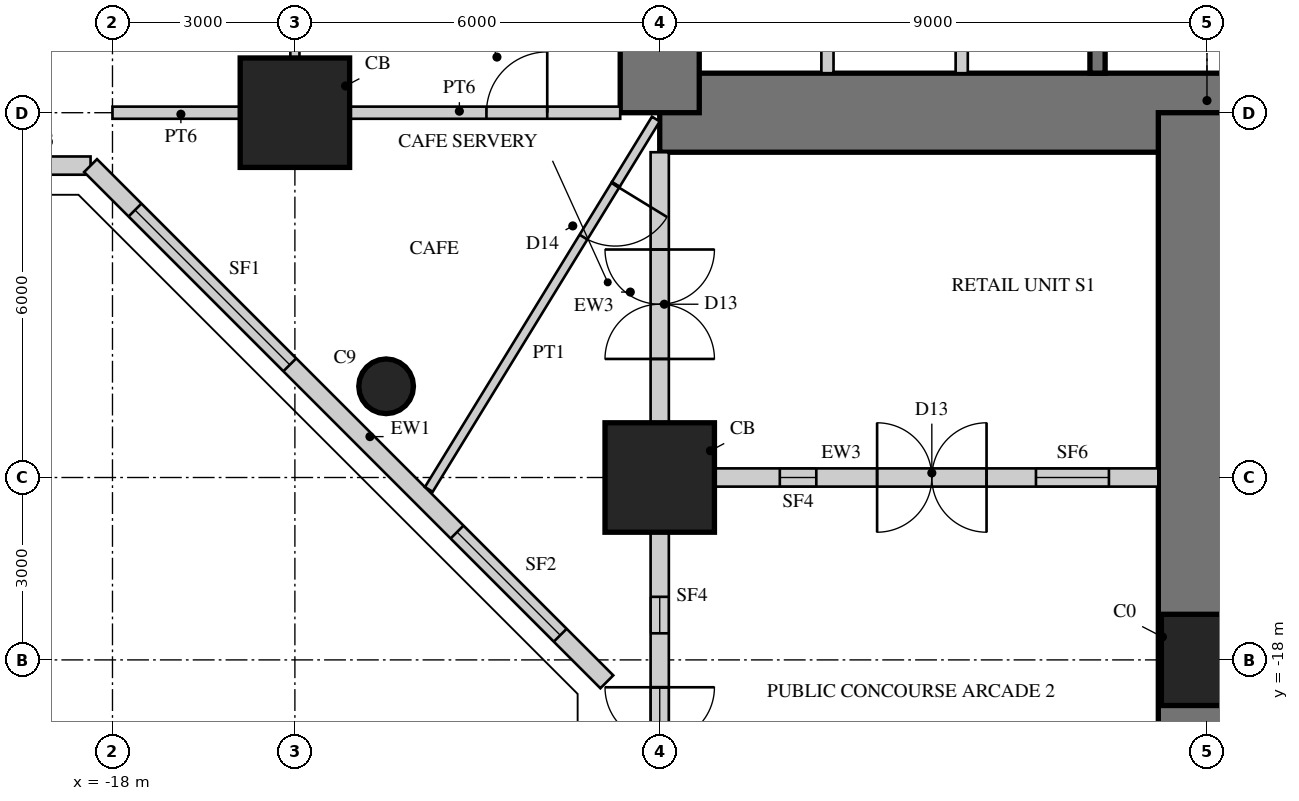
"""IFC4 building model, lengths in metres.
Left out: names, types, materials, properties, quantities, classifications, styles, units other than length and angle.
Written with IfcOpenShell. Run it as: python <this file> out.ifc"""

import sys

from ifc_helpers import new_model, si_unit, direction, frame, frame_2d, origin, origin_2d, place, context, subcontext, project, spatial, rectangle, hollow_rectangle, circle, extrude, element, fill, save


model = new_model("IFC4")
c1 = context("Model", 3, precision=1e-05, world=origin(), true_north=direction((0.0, 1.0)))
c2 = subcontext(c1, "Body", "Model", "MODEL_VIEW")
j1 = project(units=[si_unit("LENGTHUNIT", "METRE"), si_unit("PLANEANGLEUNIT", "RADIAN")], contexts=[c1])
p1 = place(None, origin())
s1 = spatial("IfcSite", under=j1, at=p1, CompositionType="ELEMENT")
p2 = place(p1, origin())
s2 = spatial("IfcBuilding", under=s1, at=p2, CompositionType="ELEMENT")
p3 = place(p2, origin())
s3 = spatial("IfcBuildingStorey", under=s2, at=p3, CompositionType="ELEMENT", Elevation=0.0)
p4 = place(p3, frame((-9.0, -9.0, 0.0), z_axis=(0.0, 0.0, 1.0), x_axis=(1.0, 0.0, 0.0)))
e1 = element("IfcWall", 1, at=p4, inside=s3, PredefinedType="SHEAR", context=c2, shape_type="SweptSolid", body=[
    extrude(rectangle(XDim=18.0, YDim=1.3, at=frame_2d((9.0, 0.0))), origin(), (0.0, 0.0, 1.0), 5.0),
])
p5 = place(p4, frame((9.8, 0.0, 0.0)))
e2 = element("IfcOpeningElement", 2, at=p5, cuts=e1, PredefinedType="OPENING", context=c2, shape_type="SweptSolid", body=[
    extrude(rectangle(XDim=1.0, YDim=2.4, at=frame_2d((0.5, 1.2))), frame((0.0, 0.66, 0.0), z_axis=(0.0, -1.0, 0.0), x_axis=(1.0, 0.0, 0.0)), (0.0, 0.0, 1.0), 1.32),
])
p6 = place(p3, frame((-9.0, 9.0, 0.0), z_axis=(0.0, 0.0, 1.0), x_axis=(0.0, -1.0, 0.0)))
e3 = element("IfcWall", 3, at=p6, inside=s3, PredefinedType="SHEAR", context=c2, shape_type="SweptSolid", body=[
    extrude(rectangle(XDim=18.0, YDim=1.3, at=frame_2d((9.0, 0.0))), origin(), (0.0, 0.0, 1.0), 5.0),
])
p7 = place(p6, frame((9.8, 0.0, 0.0)))
e4 = element("IfcOpeningElement", 4, at=p7, cuts=e3, PredefinedType="OPENING", context=c2, shape_type="SweptSolid", body=[
    extrude(rectangle(XDim=1.0, YDim=2.4, at=frame_2d((0.5, 1.2))), frame((0.0, 0.66, 0.0), z_axis=(0.0, -1.0, 0.0), x_axis=(1.0, 0.0, 0.0)), (0.0, 0.0, 1.0), 1.32),
])
p8 = place(p3, frame((-1.8, -1.875, 0.0), z_axis=(0.0, 0.0, 1.0), x_axis=(0.0, -1.0, 0.0)))
e5 = element("IfcWall", 5, at=p8, inside=s3, PredefinedType="SHEAR", context=c2, shape_type="SweptSolid", body=[
    extrude(rectangle(XDim=6.475, YDim=0.25, at=frame_2d((3.238, 0.0))), origin(), (0.0, 0.0, 1.0), 5.0),
])
p9 = place(p8, frame((1.875, 0.0, 0.0)))
e6 = element("IfcOpeningElement", 6, at=p9, cuts=e5, PredefinedType="OPENING", context=c2, shape_type="SweptSolid", body=[
    extrude(rectangle(XDim=1.6, YDim=2.4, at=frame_2d((0.8, 1.2))), frame((0.0, 0.135, 0.0), z_axis=(0.0, -1.0, 0.0), x_axis=(1.0, 0.0, 0.0)), (0.0, 0.0, 1.0), 0.27),
])
for number, where, z_axis, x_axis in (
    (7, (-4.033, -5.975, 0.0), (0.0, 0.0, 1.0), (0.0, -1.0, 0.0)),
    (8, (-6.242, -5.975, 0.0), (0.0, 0.0, 1.0), (0.0, -1.0, 0.0)),
):
    element("IfcWall", number, at=place(p3, frame(where, z_axis=z_axis, x_axis=x_axis)), inside=s3, PredefinedType="PARTITIONING", context=c2, shape_type="SweptSolid", body=[
        extrude(rectangle(XDim=2.375, YDim=0.2, at=frame_2d((1.188, 0.0))), origin(), (0.0, 0.0, 1.0), 5.0),
    ])
p10 = place(p3, frame((0.0, -9.0, 0.0), z_axis=(0.0, 0.0, 1.0), x_axis=(0.0, -1.0, 0.0)))
e9 = element("IfcWall", 9, at=p10, inside=s3, PredefinedType="SHEAR", context=c2, shape_type="SweptSolid", body=[
    extrude(rectangle(XDim=18.0, YDim=1.6, at=frame_2d((9.0, 0.0))), origin(), (0.0, 0.0, 1.0), 5.0),
])
p11 = place(p10, frame((10.05, 0.0, 0.0)))
e10 = element("IfcOpeningElement", 10, at=p11, cuts=e9, PredefinedType="OPENING", context=c2, shape_type="SweptSolid", body=[
    extrude(rectangle(XDim=1.8, YDim=2.4, at=frame_2d((0.9, 1.2))), frame((0.0, 0.81, 0.0), z_axis=(0.0, -1.0, 0.0), x_axis=(1.0, 0.0, 0.0)), (0.0, 0.0, 1.0), 1.62),
])
for number, where, z_axis, x_axis in (
    (11, (-9.0, -15.0, 0.0), (0.0, 0.0, 1.0), (1.0, 0.0, 0.0)),
    (12, (-15.0, -9.0, 0.0), (0.0, 0.0, 1.0), (1.0, 0.0, 0.0)),
):
    element("IfcColumn", number, at=place(p3, frame(where, z_axis=z_axis, x_axis=x_axis)), inside=s3, PredefinedType="COLUMN", context=c2, shape_type="SweptSolid", body=[
        extrude(rectangle(XDim=1.8, YDim=1.8, at=origin_2d()), origin(), (0.0, 0.0, 1.0), 5.0),
    ])
p12 = place(p3, frame((0.0, -18.0, 0.0), z_axis=(0.0, 0.0, 1.0), x_axis=(1.0, 0.0, 0.0)))
e13 = element("IfcColumn", 13, at=p12, inside=s3, PredefinedType="COLUMN", context=c2, shape_type="SweptSolid", body=[
    extrude(rectangle(XDim=1.5, YDim=1.5, at=origin_2d()), origin(), (0.0, 0.0, 1.0), 5.0),
])
p13 = place(p3, frame((-13.5, -13.5, 0.0), z_axis=(0.0, 0.0, 1.0), x_axis=(1.0, 0.0, 0.0)))
e14 = element("IfcColumn", 14, at=p13, inside=s3, PredefinedType="COLUMN", context=c2, shape_type="SweptSolid", body=[
    extrude(circle(Radius=0.45, at=origin_2d()), origin(), (0.0, 0.0, 1.0), 5.0),
])
p14 = place(p3, frame((-24.36, -9.87, 0.0), z_axis=(0.0, 0.0, 1.0), x_axis=(1.0, 0.0, 0.0)))
e15 = element("IfcWall", 15, at=p14, inside=s3, PredefinedType="SOLIDWALL", context=c2, shape_type="SweptSolid", body=[
    extrude(rectangle(XDim=6.0, YDim=0.3, at=frame_2d((3.0, 0.0))), origin(), (0.0, 0.0, 1.0), 4.8),
])
p15 = place(p14, frame((1.475, 0.0, 0.3)))
e16 = element("IfcOpeningElement", 16, at=p15, cuts=e15, PredefinedType="OPENING", context=c2, shape_type="SweptSolid", body=[
    extrude(rectangle(XDim=1.2, YDim=3.9, at=frame_2d((0.6, 1.95))), frame((0.0, 0.16, 0.0), z_axis=(0.0, -1.0, 0.0), x_axis=(1.0, 0.0, 0.0)), (0.0, 0.0, 1.0), 0.32),
])
p16 = place(p14, frame((3.77, 0.0, 0.3)))
e17 = element("IfcOpeningElement", 17, at=p16, cuts=e15, PredefinedType="OPENING", context=c2, shape_type="SweptSolid", body=[
    extrude(rectangle(XDim=1.2, YDim=3.9, at=frame_2d((0.6, 1.95))), frame((0.0, 0.16, 0.0), z_axis=(0.0, -1.0, 0.0), x_axis=(1.0, 0.0, 0.0)), (0.0, 0.0, 1.0), 0.32),
])
p17 = place(p3, frame((-18.36, -9.87, 0.0), z_axis=(0.0, 0.0, 1.0), x_axis=(0.707106781187, -0.707106781187, 0.0)))
e18 = element("IfcWall", 18, at=p17, inside=s3, PredefinedType="SOLIDWALL", context=c2, shape_type="SweptSolid", body=[
    extrude(rectangle(XDim=12.007, YDim=0.3, at=frame_2d((6.003, 0.0))), origin(), (0.0, 0.0, 1.0), 4.8),
])
p18 = place(p17, frame((1.034, 0.0, 0.3)))
e19 = element("IfcOpeningElement", 19, at=p18, cuts=e18, PredefinedType="OPENING", context=c2, shape_type="SweptSolid", body=[
    extrude(rectangle(XDim=3.6, YDim=3.9, at=frame_2d((1.8, 1.95))), frame((0.0, 0.16, 0.0), z_axis=(0.0, -1.0, 0.0), x_axis=(1.0, 0.0, 0.0)), (0.0, 0.0, 1.0), 0.32),
])
p19 = place(p17, frame((8.523, 0.0, 0.3)))
e20 = element("IfcOpeningElement", 20, at=p19, cuts=e18, PredefinedType="OPENING", context=c2, shape_type="SweptSolid", body=[
    extrude(rectangle(XDim=2.4, YDim=3.9, at=frame_2d((1.2, 1.95))), frame((0.0, 0.16, 0.0), z_axis=(0.0, -1.0, 0.0), x_axis=(1.0, 0.0, 0.0)), (0.0, 0.0, 1.0), 0.32),
])
p20 = place(p3, frame((-8.25, -15.0, 0.0), z_axis=(0.0, 0.0, 1.0), x_axis=(1.0, 0.0, 0.0)))
e21 = element("IfcWall", 21, at=p20, inside=s3, PredefinedType="SOLIDWALL", context=c2, shape_type="SweptSolid", body=[
    extrude(rectangle(XDim=7.45, YDim=0.3, at=frame_2d((3.725, 0.0))), origin(), (0.0, 0.0, 1.0), 3.85),
])
p21 = place(p20, frame((2.825, 0.0, 0.0)))
e22 = element("IfcOpeningElement", 22, at=p21, cuts=e21, PredefinedType="OPENING", context=c2, shape_type="SweptSolid", body=[
    extrude(rectangle(XDim=1.8, YDim=2.4, at=frame_2d((0.9, 1.2))), frame((0.0, 0.16, 0.0), z_axis=(0.0, -1.0, 0.0), x_axis=(1.0, 0.0, 0.0)), (0.0, 0.0, 1.0), 0.32),
])
p22 = place(p20, frame((1.225, 0.0, 0.3)))
e23 = element("IfcOpeningElement", 23, at=p22, cuts=e21, PredefinedType="OPENING", context=c2, shape_type="SweptSolid", body=[
    extrude(rectangle(XDim=0.6, YDim=3.4, at=frame_2d((0.3, 1.7))), frame((0.0, 0.16, 0.0), z_axis=(0.0, -1.0, 0.0), x_axis=(1.0, 0.0, 0.0)), (0.0, 0.0, 1.0), 0.32),
])
p23 = place(p20, frame((5.438, 0.0, 0.3)))
e24 = element("IfcOpeningElement", 24, at=p23, cuts=e21, PredefinedType="OPENING", context=c2, shape_type="SweptSolid", body=[
    extrude(rectangle(XDim=1.2, YDim=3.4, at=frame_2d((0.6, 1.7))), frame((0.0, 0.16, 0.0), z_axis=(0.0, -1.0, 0.0), x_axis=(1.0, 0.0, 0.0)), (0.0, 0.0, 1.0), 0.32),
])
p24 = place(p3, frame((-15.0, -2.375, 0.0), z_axis=(0.0, 0.0, 1.0), x_axis=(0.0, -1.0, 0.0)))
e25 = element("IfcWall", 25, at=p24, inside=s3, PredefinedType="PARTITIONING", context=c2, shape_type="SweptSolid", body=[
    extrude(rectangle(XDim=5.875, YDim=0.15, at=frame_2d((2.938, 0.0))), origin(), (0.0, 0.0, 1.0), 3.85),
])
p25 = place(p24, frame((0.969, 0.0, 0.0)))
e26 = element("IfcOpeningElement", 26, at=p25, cuts=e25, PredefinedType="OPENING", context=c2, shape_type="SweptSolid", body=[
    extrude(rectangle(XDim=1.0, YDim=2.1, at=frame_2d((0.5, 1.05))), frame((0.0, 0.085, 0.0), z_axis=(0.0, -1.0, 0.0), x_axis=(1.0, 0.0, 0.0)), (0.0, 0.0, 1.0), 0.17),
])
p26 = place(p24, frame((3.906, 0.0, 0.0)))
e27 = element("IfcOpeningElement", 27, at=p26, cuts=e25, PredefinedType="OPENING", context=c2, shape_type="SweptSolid", body=[
    extrude(rectangle(XDim=1.0, YDim=2.1, at=frame_2d((0.5, 1.05))), frame((0.0, 0.085, 0.0), z_axis=(0.0, -1.0, 0.0), x_axis=(1.0, 0.0, 0.0)), (0.0, 0.0, 1.0), 0.17),
])
p27 = place(p3, frame((-9.064, -9.104, 0.0), z_axis=(0.0, 0.0, 1.0), x_axis=(-0.522444037035, -0.852673576562, 0.0)))
e28 = element("IfcWall", 28, at=p27, inside=s3, PredefinedType="PARTITIONING", context=c2, shape_type="SweptSolid", body=[
    extrude(rectangle(XDim=1.261, YDim=0.15, at=frame_2d((0.631, 0.0))), origin(), (0.0, 0.0, 1.0), 3.9),
])
p28 = place(p3, frame((-9.723, -10.18, 0.0), z_axis=(0.0, 0.0, 1.0), x_axis=(-0.522582491182, -0.852588728468, 0.0)))
e29 = element("IfcWall", 29, at=p28, inside=s3, PredefinedType="PARTITIONING", context=c2, shape_type="SweptSolid", body=[
    extrude(rectangle(XDim=5.884, YDim=0.15, at=frame_2d((2.942, 0.0))), origin(), (0.0, 0.0, 1.0), 4.8),
])
p29 = place(p28, frame((0.016, 0.0, 0.0)))
e30 = element("IfcOpeningElement", 30, at=p29, cuts=e29, PredefinedType="OPENING", context=c2, shape_type="SweptSolid", body=[
    extrude(rectangle(XDim=1.0, YDim=2.2, at=frame_2d((0.5, 1.1))), frame((0.0, 0.085, 0.0), z_axis=(0.0, -1.0, 0.0), x_axis=(1.0, 0.0, 0.0)), (0.0, 0.0, 1.0), 0.17),
])
p30 = place(p3, frame((-9.65, -9.0, 0.0), z_axis=(0.0, 0.0, 1.0), x_axis=(-1.0, 0.0, 0.0)))
e31 = element("IfcWall", 31, at=p30, inside=s3, PredefinedType="SOLIDWALL", context=c2, shape_type="SweptSolid", body=[
    extrude(rectangle(XDim=4.6, YDim=0.2, at=frame_2d((2.3, 0.0))), origin(), (0.0, 0.0, 1.0), 3.8),
])
p31 = place(p30, frame((1.2, 0.0, 0.0)))
e32 = element("IfcOpeningElement", 32, at=p31, cuts=e31, PredefinedType="OPENING", context=c2, shape_type="SweptSolid", body=[
    extrude(rectangle(XDim=1.0, YDim=2.2, at=frame_2d((0.5, 1.1))), frame((0.0, 0.11, 0.0), z_axis=(0.0, -1.0, 0.0), x_axis=(1.0, 0.0, 0.0)), (0.0, 0.0, 1.0), 0.22),
])
p32 = place(p3, frame((-15.75, -9.0, 0.0), z_axis=(0.0, 0.0, 1.0), x_axis=(-1.0, 0.0, 0.0)))
e33 = element("IfcWall", 33, at=p32, inside=s3, PredefinedType="SOLIDWALL", context=c2, shape_type="SweptSolid", body=[
    extrude(rectangle(XDim=2.25, YDim=0.2, at=frame_2d((1.125, 0.0))), origin(), (0.0, 0.0, 1.0), 3.8),
])
p33 = place(p3, frame((-9.0, -14.25, 0.0), z_axis=(0.0, 0.0, 1.0), x_axis=(0.0, 1.0, 0.0)))
e34 = element("IfcWall", 34, at=p33, inside=s3, PredefinedType="SOLIDWALL", context=c2, shape_type="SweptSolid", body=[
    extrude(rectangle(XDim=4.6, YDim=0.3, at=frame_2d((2.3, 0.0))), origin(), (0.0, 0.0, 1.0), 3.8),
])
p34 = place(p33, frame((1.2, 0.0, 0.0)))
e35 = element("IfcOpeningElement", 35, at=p34, cuts=e34, PredefinedType="OPENING", context=c2, shape_type="SweptSolid", body=[
    extrude(rectangle(XDim=1.8, YDim=2.4, at=frame_2d((0.9, 1.2))), frame((0.0, 0.16, 0.0), z_axis=(0.0, -1.0, 0.0), x_axis=(1.0, 0.0, 0.0)), (0.0, 0.0, 1.0), 0.32),
])
p35 = place(p3, frame((-9.0, -23.25, 0.0), z_axis=(0.0, 0.0, 1.0), x_axis=(0.0, 1.0, 0.0)))
e36 = element("IfcWall", 36, at=p35, inside=s3, PredefinedType="SOLIDWALL", context=c2, shape_type="SweptSolid", body=[
    extrude(rectangle(XDim=7.5, YDim=0.3, at=frame_2d((3.75, 0.0))), origin(), (0.0, 0.0, 1.0), 3.8),
])
p36 = place(p35, frame((3.0, 0.0, 0.0)))
e37 = element("IfcOpeningElement", 37, at=p36, cuts=e36, PredefinedType="OPENING", context=c2, shape_type="SweptSolid", body=[
    extrude(rectangle(XDim=1.8, YDim=2.4, at=frame_2d((0.9, 1.2))), frame((0.0, 0.16, 0.0), z_axis=(0.0, -1.0, 0.0), x_axis=(1.0, 0.0, 0.0)), (0.0, 0.0, 1.0), 0.32),
])
p37 = place(p35, frame((2.24, 0.0, 0.3)))
e38 = element("IfcOpeningElement", 38, at=p37, cuts=e36, PredefinedType="OPENING", context=c2, shape_type="SweptSolid", body=[
    extrude(rectangle(XDim=0.6, YDim=3.4, at=frame_2d((0.3, 1.7))), frame((0.0, 0.16, 0.0), z_axis=(0.0, -1.0, 0.0), x_axis=(1.0, 0.0, 0.0)), (0.0, 0.0, 1.0), 0.32),
])
p38 = place(p35, frame((5.688, 0.0, 0.3)))
e39 = element("IfcOpeningElement", 39, at=p38, cuts=e36, PredefinedType="OPENING", context=c2, shape_type="SweptSolid", body=[
    extrude(rectangle(XDim=0.6, YDim=3.4, at=frame_2d((0.3, 1.7))), frame((0.0, 0.16, 0.0), z_axis=(0.0, -1.0, 0.0), x_axis=(1.0, 0.0, 0.0)), (0.0, 0.0, 1.0), 0.32),
])
p39 = place(p35, frame((3.0, 0.0, 2.6)))
e40 = element("IfcOpeningElement", 40, at=p39, cuts=e36, PredefinedType="OPENING", context=c2, shape_type="SweptSolid", body=[
    extrude(rectangle(XDim=1.8, YDim=1.1, at=frame_2d((0.9, 0.55))), frame((0.0, 0.16, 0.0), z_axis=(0.0, -1.0, 0.0), x_axis=(1.0, 0.0, 0.0)), (0.0, 0.0, 1.0), 0.32),
])
p40 = place(p18, origin())
e41 = element("IfcWindow", 41, at=p40, inside=s3, PartitioningType="SINGLE_PANEL", PredefinedType="WINDOW", context=c2, shape_type="SweptSolid", body=[
    extrude(hollow_rectangle(XDim=3.6, YDim=3.9, WallThickness=0.06, at=frame_2d((1.8, 1.95))), frame((0.0, 0.03, 0.0), z_axis=(0.0, -1.0, 0.0), x_axis=(1.0, 0.0, 0.0)), (0.0, 0.0, 1.0), 0.06),
    extrude(rectangle(XDim=3.479, YDim=3.779, at=frame_2d((1.8, 1.95))), frame((0.0, 0.03, 0.0), z_axis=(0.0, -1.0, 0.0), x_axis=(1.0, 0.0, 0.0)), (0.0, 0.0, 1.0), 0.06),
])
fill(e19, e41)
p41 = place(p19, origin())
e42 = element("IfcWindow", 42, at=p41, inside=s3, PartitioningType="SINGLE_PANEL", PredefinedType="WINDOW", context=c2, shape_type="SweptSolid", body=[
    extrude(hollow_rectangle(XDim=2.4, YDim=3.9, WallThickness=0.06, at=frame_2d((1.2, 1.95))), frame((0.0, 0.03, 0.0), z_axis=(0.0, -1.0, 0.0), x_axis=(1.0, 0.0, 0.0)), (0.0, 0.0, 1.0), 0.06),
    extrude(rectangle(XDim=2.279, YDim=3.779, at=frame_2d((1.2, 1.95))), frame((0.0, 0.03, 0.0), z_axis=(0.0, -1.0, 0.0), x_axis=(1.0, 0.0, 0.0)), (0.0, 0.0, 1.0), 0.06),
])
fill(e20, e42)
p42 = place(p21, origin())
e43 = element("IfcDoor", 43, at=p42, inside=s3, OperationType="DOUBLE_DOOR_DOUBLE_SWING", PredefinedType="DOOR", context=c2, shape_type="SweptSolid", body=[
    extrude(hollow_rectangle(XDim=1.8, YDim=2.4, WallThickness=0.06, at=frame_2d((0.9, 1.2))), frame((0.0, 0.025, 0.0), z_axis=(0.0, -1.0, 0.0), x_axis=(1.0, 0.0, 0.0)), (0.0, 0.0, 1.0), 0.05),
    extrude(rectangle(XDim=1.679, YDim=2.279, at=frame_2d((0.9, 1.2))), frame((0.0, 0.025, 0.0), z_axis=(0.0, -1.0, 0.0), x_axis=(1.0, 0.0, 0.0)), (0.0, 0.0, 1.0), 0.05),
])
fill(e22, e43)
p43 = place(p22, origin())
e44 = element("IfcWindow", 44, at=p43, inside=s3, PartitioningType="SINGLE_PANEL", PredefinedType="WINDOW", context=c2, shape_type="SweptSolid", body=[
    extrude(hollow_rectangle(XDim=0.6, YDim=3.4, WallThickness=0.06, at=frame_2d((0.3, 1.7))), frame((0.0, 0.03, 0.0), z_axis=(0.0, -1.0, 0.0), x_axis=(1.0, 0.0, 0.0)), (0.0, 0.0, 1.0), 0.06),
    extrude(rectangle(XDim=0.479, YDim=3.279, at=frame_2d((0.3, 1.7))), frame((0.0, 0.03, 0.0), z_axis=(0.0, -1.0, 0.0), x_axis=(1.0, 0.0, 0.0)), (0.0, 0.0, 1.0), 0.06),
])
fill(e23, e44)
p44 = place(p23, origin())
e45 = element("IfcWindow", 45, at=p44, inside=s3, PartitioningType="SINGLE_PANEL", PredefinedType="WINDOW", context=c2, shape_type="SweptSolid", body=[
    extrude(hollow_rectangle(XDim=1.2, YDim=3.4, WallThickness=0.06, at=frame_2d((0.6, 1.7))), frame((0.0, 0.03, 0.0), z_axis=(0.0, -1.0, 0.0), x_axis=(1.0, 0.0, 0.0)), (0.0, 0.0, 1.0), 0.06),
    extrude(rectangle(XDim=1.079, YDim=3.279, at=frame_2d((0.6, 1.7))), frame((0.0, 0.03, 0.0), z_axis=(0.0, -1.0, 0.0), x_axis=(1.0, 0.0, 0.0)), (0.0, 0.0, 1.0), 0.06),
])
fill(e24, e45)
p45 = place(p29, origin())
e46 = element("IfcDoor", 46, at=p45, inside=s3, OperationType="SINGLE_SWING_LEFT", PredefinedType="DOOR", context=c2, shape_type="SweptSolid", body=[
    extrude(rectangle(XDim=1.0, YDim=2.2, at=frame_2d((0.5, 1.1))), frame((0.0, 0.025, 0.0), z_axis=(0.0, -1.0, 0.0), x_axis=(1.0, 0.0, 0.0)), (0.0, 0.0, 1.0), 0.05),
])
fill(e30, e46)
p46 = place(p31, frame((1.0, 0.0, 0.0), z_axis=(0.0, 0.0, 1.0), x_axis=(-1.0, 0.0, 0.0)))
e47 = element("IfcDoor", 47, at=p46, inside=s3, OperationType="SINGLE_SWING_RIGHT", PredefinedType="DOOR", context=c2, shape_type="SweptSolid", body=[
    extrude(rectangle(XDim=1.0, YDim=2.2, at=frame_2d((0.5, 1.1))), frame((0.0, 0.025, 0.0), z_axis=(0.0, -1.0, 0.0), x_axis=(1.0, 0.0, 0.0)), (0.0, 0.0, 1.0), 0.05),
])
fill(e32, e47)
p47 = place(p34, origin())
e48 = element("IfcDoor", 48, at=p47, inside=s3, OperationType="DOUBLE_DOOR_DOUBLE_SWING", PredefinedType="DOOR", context=c2, shape_type="SweptSolid", body=[
    extrude(hollow_rectangle(XDim=1.8, YDim=2.4, WallThickness=0.06, at=frame_2d((0.9, 1.2))), frame((0.0, 0.025, 0.0), z_axis=(0.0, -1.0, 0.0), x_axis=(1.0, 0.0, 0.0)), (0.0, 0.0, 1.0), 0.05),
    extrude(rectangle(XDim=1.679, YDim=2.279, at=frame_2d((0.9, 1.2))), frame((0.0, 0.025, 0.0), z_axis=(0.0, -1.0, 0.0), x_axis=(1.0, 0.0, 0.0)), (0.0, 0.0, 1.0), 0.05),
])
fill(e35, e48)
p48 = place(p36, origin())
e49 = element("IfcDoor", 49, at=p48, inside=s3, OperationType="DOUBLE_DOOR_DOUBLE_SWING", PredefinedType="DOOR", context=c2, shape_type="SweptSolid", body=[
    extrude(hollow_rectangle(XDim=1.8, YDim=2.4, WallThickness=0.06, at=frame_2d((0.9, 1.2))), frame((0.0, 0.025, 0.0), z_axis=(0.0, -1.0, 0.0), x_axis=(1.0, 0.0, 0.0)), (0.0, 0.0, 1.0), 0.05),
    extrude(rectangle(XDim=1.679, YDim=2.279, at=frame_2d((0.9, 1.2))), frame((0.0, 0.025, 0.0), z_axis=(0.0, -1.0, 0.0), x_axis=(1.0, 0.0, 0.0)), (0.0, 0.0, 1.0), 0.05),
])
fill(e37, e49)
p49 = place(p38, origin())
e50 = element("IfcWindow", 50, at=p49, inside=s3, PartitioningType="SINGLE_PANEL", PredefinedType="WINDOW", context=c2, shape_type="SweptSolid", body=[
    extrude(hollow_rectangle(XDim=0.6, YDim=3.4, WallThickness=0.06, at=frame_2d((0.3, 1.7))), frame((0.0, 0.03, 0.0), z_axis=(0.0, -1.0, 0.0), x_axis=(1.0, 0.0, 0.0)), (0.0, 0.0, 1.0), 0.06),
    extrude(rectangle(XDim=0.479, YDim=3.279, at=frame_2d((0.3, 1.7))), frame((0.0, 0.03, 0.0), z_axis=(0.0, -1.0, 0.0), x_axis=(1.0, 0.0, 0.0)), (0.0, 0.0, 1.0), 0.06),
])
fill(e39, e50)
p50 = place(p39, origin())
e51 = element("IfcWindow", 51, at=p50, inside=s3, PartitioningType="SINGLE_PANEL", PredefinedType="WINDOW", context=c2, shape_type="SweptSolid", body=[
    extrude(hollow_rectangle(XDim=1.8, YDim=1.1, WallThickness=0.06, at=frame_2d((0.9, 0.55))), frame((0.0, 0.03, 0.0), z_axis=(0.0, -1.0, 0.0), x_axis=(1.0, 0.0, 0.0)), (0.0, 0.0, 1.0), 0.06),
    extrude(rectangle(XDim=1.679, YDim=0.979, at=frame_2d((0.9, 0.55))), frame((0.0, 0.03, 0.0), z_axis=(0.0, -1.0, 0.0), x_axis=(1.0, 0.0, 0.0)), (0.0, 0.0, 1.0), 0.06),
])
fill(e40, e51)
save(model, sys.argv[1])
